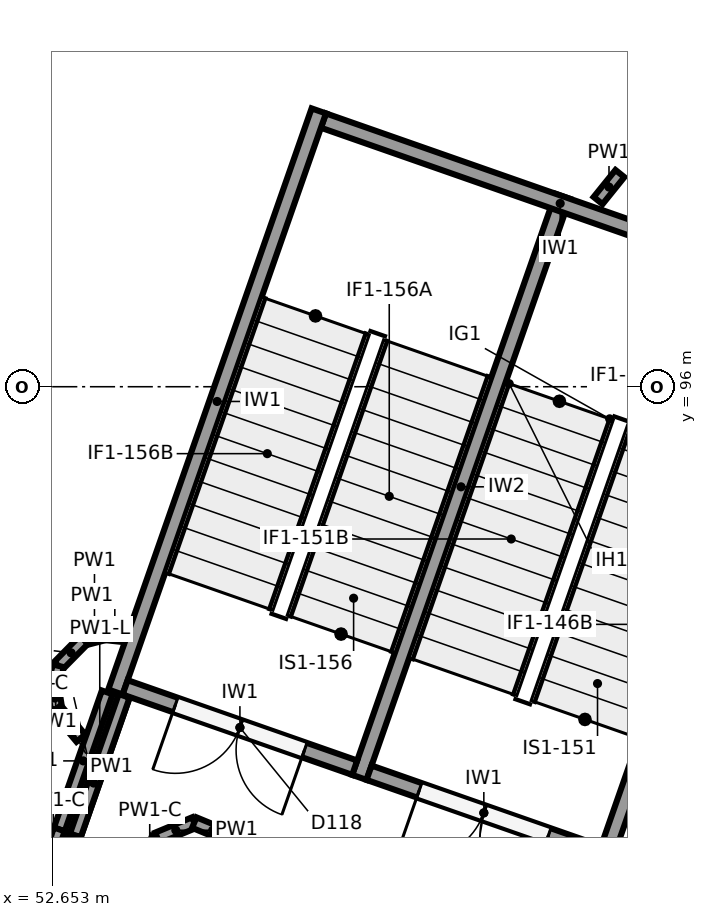
"""IFC4 building model, lengths in metres.
Left out: names, types, materials, properties, quantities, classifications, styles, units other than length and angle.
Written with IfcOpenShell. Run it as: python <this file> out.ifc"""

import sys

from ifc_helpers import new_model, si_unit, direction, frame, frame_2d, origin, origin_2d, place, context, subcontext, project, spatial, rectangle, circle, extrude, element, fill, save


model = new_model("IFC4")
c1 = context("Model", 3, precision=1e-05, world=origin(), true_north=direction((0.0, 1.0)))
c2 = subcontext(c1, "Body", "Model", "MODEL_VIEW")
j1 = project(units=[si_unit("LENGTHUNIT", "METRE"), si_unit("PLANEANGLEUNIT", "RADIAN")], contexts=[c1])
p1 = place(None, origin())
s1 = spatial("IfcSite", under=j1, at=p1, CompositionType="ELEMENT")
p2 = place(p1, origin())
s2 = spatial("IfcBuilding", under=s1, at=p2, CompositionType="ELEMENT")
p3 = place(p2, frame((0.0, 0.0, -4.0)))
s3 = spatial("IfcBuildingStorey", under=s2, at=p3, CompositionType="ELEMENT", Elevation=-4.0)
p4 = place(p3, frame((54.523, 89.579, -1.2), z_axis=(0.0, 0.0, 1.0), x_axis=(1.0, 0.0, 0.0)))
e1 = element("IfcColumn", 1, at=p4, inside=s3, PredefinedType="COLUMN", context=c2, shape_type="SweptSolid", body=[
    extrude(circle(Radius=0.55, at=origin_2d()), origin(), (0.0, 0.0, 1.0), 5.2),
])
p5 = place(p3, frame((62.58, 97.383, -1.2), z_axis=(0.0, 0.0, 1.0), x_axis=(-0.330290006891, -0.943879500438, 0.0)))
e2 = element("IfcWall", 2, at=p5, inside=s3, PredefinedType="SHEAR", context=c2, shape_type="SweptSolid", body=[
    extrude(rectangle(XDim=8.1, YDim=0.2, at=frame_2d((4.05, 0.0))), origin(), (0.0, 0.0, 1.0), 4.8),
])
p6 = place(p3, frame((56.162, 99.629, -1.2), z_axis=(0.0, 0.0, 1.0), x_axis=(-0.330280610426, -0.943882788474, 0.0)))
e3 = element("IfcWall", 3, at=p6, inside=s3, PredefinedType="SHEAR", context=c2, shape_type="SweptSolid", body=[
    extrude(rectangle(XDim=8.1, YDim=0.2, at=frame_2d((4.05, 0.0))), origin(), (0.0, 0.0, 1.0), 4.8),
])
p7 = place(p3, frame((62.453, 97.322, -1.2), z_axis=(0.0, 0.0, 1.0), x_axis=(-0.943880844925, 0.330286164688, 0.0)))
e4 = element("IfcWall", 4, at=p7, inside=s3, PredefinedType="SHEAR", context=c2, shape_type="SweptSolid", body=[
    extrude(rectangle(XDim=6.6, YDim=0.2, at=frame_2d((3.3, 0.0))), origin(), (0.0, 0.0, 1.0), 4.8),
])
p8 = place(p3, frame((59.371, 98.506, -1.2), z_axis=(0.0, 0.0, 1.0), x_axis=(-0.330280610426, -0.943882788474, 0.0)))
e5 = element("IfcWall", 5, at=p8, inside=s3, PredefinedType="SHEAR", context=c2, shape_type="SweptSolid", body=[
    extrude(rectangle(XDim=8.1, YDim=0.2, at=frame_2d((4.05, 0.0))), origin(), (0.0, 0.0, 1.0), 4.8),
])
p9 = place(p3, frame((59.844, 89.865, -1.2), z_axis=(0.0, 0.0, 1.0), x_axis=(-0.943886898693, 0.330268863922, 0.0)))
e6 = element("IfcWall", 6, at=p9, inside=s3, PredefinedType="SHEAR", context=c2, shape_type="SweptSolid", body=[
    extrude(rectangle(XDim=3.2, YDim=0.2, at=frame_2d((1.6, 0.0))), origin(), (0.0, 0.0, 1.0), 4.8),
])
p10 = place(p9, frame((0.7, 0.0, 1.2)))
e7 = element("IfcOpeningElement", 7, at=p10, cuts=e6, PredefinedType="OPENING", context=c2, shape_type="SweptSolid", body=[
    extrude(rectangle(XDim=1.8, YDim=2.1, at=frame_2d((0.9, 1.05))), frame((0.0, 0.11, 0.0), z_axis=(0.0, -1.0, 0.0), x_axis=(1.0, 0.0, 0.0)), (0.0, 0.0, 1.0), 0.22),
])
p11 = place(p3, frame((56.634, 90.988, -1.2), z_axis=(0.0, 0.0, 1.0), x_axis=(-0.943886898693, 0.330268863922, 0.0)))
e8 = element("IfcWall", 8, at=p11, inside=s3, PredefinedType="SHEAR", context=c2, shape_type="SweptSolid", body=[
    extrude(rectangle(XDim=3.2, YDim=0.2, at=frame_2d((1.6, 0.0))), origin(), (0.0, 0.0, 1.0), 4.8),
])
p12 = place(p11, frame((0.7, 0.0, 1.2)))
e9 = element("IfcOpeningElement", 9, at=p12, cuts=e8, PredefinedType="OPENING", context=c2, shape_type="SweptSolid", body=[
    extrude(rectangle(XDim=1.8, YDim=2.1, at=frame_2d((0.9, 1.05))), frame((0.0, 0.11, 0.0), z_axis=(0.0, -1.0, 0.0), x_axis=(1.0, 0.0, 0.0)), (0.0, 0.0, 1.0), 0.22),
])
p13 = place(p3, frame((53.379, 91.979, 0.0), z_axis=(0.0, 0.0, 1.0), x_axis=(-0.330190985446, -0.943914145, 0.0)))
e10 = element("IfcWall", 10, at=p13, inside=s3, PredefinedType="PARTITIONING", context=c2, shape_type="SweptSolid", body=[
    extrude(rectangle(XDim=1.91, YDim=0.15, at=frame_2d((0.955, 0.0))), origin(), (0.0, 0.0, 1.0), 3.6),
])
p14 = place(p3, frame((52.748, 90.176, 0.0), z_axis=(0.0, 0.0, 1.0), x_axis=(-0.330464354332, -0.943818473286, 0.0)))
e11 = element("IfcWall", 11, at=p14, inside=s3, PredefinedType="PARTITIONING", context=c2, shape_type="SweptSolid", body=[
    extrude(rectangle(XDim=0.477, YDim=0.15, at=frame_2d((0.239, 0.0))), origin(), (0.0, 0.0, 1.0), 2.7),
])
p15 = place(p3, frame((60.124, 98.805, 0.0), z_axis=(0.0, 0.0, 1.0), x_axis=(-0.628076009292, -0.778151994505, 0.0)))
e12 = element("IfcWall", 12, at=p15, inside=s3, PredefinedType="PARTITIONING", context=c2, shape_type="SweptSolid", body=[
    extrude(rectangle(XDim=0.457, YDim=0.15, at=frame_2d((0.229, 0.0))), origin(), (0.0, 0.0, 1.0), 3.6),
])
p16 = place(p3, frame((53.837, 89.579, 0.0), z_axis=(0.0, 0.0, 1.0), x_axis=(0.382269640564, 0.924050822143, 0.0)))
e13 = element("IfcWall", 13, at=p16, inside=s3, PredefinedType="PARTITIONING", context=c2, shape_type="SweptSolid", body=[
    extrude(rectangle(XDim=0.525, YDim=0.15, at=frame_2d((0.262, 0.0))), origin(), (0.0, 0.0, 1.0), 2.7),
])
p17 = place(p3, frame((54.038, 90.064, 0.0), z_axis=(0.0, 0.0, 1.0), x_axis=(0.923926306398, 0.382570490689, 0.0)))
e14 = element("IfcWall", 14, at=p17, inside=s3, PredefinedType="PARTITIONING", context=c2, shape_type="SweptSolid", body=[
    extrude(rectangle(XDim=0.526, YDim=0.15, at=frame_2d((0.263, 0.0))), origin(), (0.0, 0.0, 1.0), 3.6),
])
p18 = place(p3, frame((54.523, 90.266, 0.0), z_axis=(0.0, 0.0, 1.0), x_axis=(0.923886494024, -0.382666625355, 0.0)))
e15 = element("IfcWall", 15, at=p18, inside=s3, PredefinedType="PARTITIONING", context=c2, shape_type="SweptSolid", body=[
    extrude(rectangle(XDim=0.525, YDim=0.15, at=frame_2d((0.263, 0.0))), origin(), (0.0, 0.0, 1.0), 3.0),
])
p19 = place(p3, frame((55.009, 90.065, 0.0), z_axis=(0.0, 0.0, 1.0), x_axis=(0.3830633983, -0.923722053911, 0.0)))
e16 = element("IfcWall", 16, at=p19, inside=s3, PredefinedType="PARTITIONING", context=c2, shape_type="SweptSolid", body=[
    extrude(rectangle(XDim=0.525, YDim=0.15, at=frame_2d((0.263, 0.0))), origin(), (0.0, 0.0, 1.0), 2.5),
])
p20 = place(p3, frame((53.601, 91.933, 0.0), z_axis=(0.0, 0.0, 1.0), x_axis=(-0.330328049416, -0.943866187428, 0.0)))
e17 = element("IfcWall", 17, at=p20, inside=s3, PredefinedType="PARTITIONING", context=c2, shape_type="SweptSolid", body=[
    extrude(rectangle(XDim=2.43, YDim=0.15, at=frame_2d((1.215, 0.0))), origin(), (0.0, 0.0, 1.0), 2.7),
])
p21 = place(p3, frame((53.601, 91.933, 2.7), z_axis=(0.0, 0.0, 1.0), x_axis=(-0.330283297121, -0.943881848349, 0.0)))
e18 = element("IfcWall", 18, at=p21, inside=s3, PredefinedType="PARTITIONING", context=c2, shape_type="SweptSolid", body=[
    extrude(rectangle(XDim=1.944, YDim=0.15, at=frame_2d((0.972, 0.0))), origin(), (0.0, 0.0, 1.0), 0.9),
])
p22 = place(p3, frame((53.606, 92.715, 0.0), z_axis=(0.0, 0.0, 1.0), x_axis=(-0.99455723192, 0.104191710011, 0.0)))
e19 = element("IfcWall", 19, at=p22, inside=s3, PredefinedType="PARTITIONING", context=c2, shape_type="SweptSolid", body=[
    extrude(rectangle(XDim=0.258, YDim=0.15, at=frame_2d((0.129, 0.0))), origin(), (0.0, 0.0, 1.0), 3.6),
])
p23 = place(p3, frame((53.35, 92.741, 0.0), z_axis=(0.0, 0.0, 1.0), x_axis=(-0.968217741574, -0.250108786133, 0.0)))
e20 = element("IfcWall", 20, at=p23, inside=s3, PredefinedType="PARTITIONING", context=c2, shape_type="SweptSolid", body=[
    extrude(rectangle(XDim=0.288, YDim=0.15, at=frame_2d((0.144, 0.0))), origin(), (0.0, 0.0, 1.0), 3.6),
])
p24 = place(p3, frame((53.071, 92.669, 0.0), z_axis=(0.0, 0.0, 1.0), x_axis=(-0.701994133163, -0.712182727258, 0.0)))
e21 = element("IfcWall", 21, at=p24, inside=s3, PredefinedType="PARTITIONING", context=c2, shape_type="SweptSolid", body=[
    extrude(rectangle(XDim=0.479, YDim=0.15, at=frame_2d((0.24, 0.0))), origin(), (0.0, 0.0, 1.0), 3.6),
])
p25 = place(p3, frame((52.735, 92.328, 0.0), z_axis=(0.0, 0.0, 1.0), x_axis=(-0.237169904652, -0.971468185957, 0.0)))
e22 = element("IfcWall", 22, at=p25, inside=s3, PredefinedType="PARTITIONING", context=c2, shape_type="SweptSolid", body=[
    extrude(rectangle(XDim=0.289, YDim=0.15, at=frame_2d((0.145, 0.0))), origin(), (0.0, 0.0, 1.0), 3.6),
])
p26 = place(p3, frame((52.666, 92.047, 0.0), z_axis=(0.0, 0.0, 1.0), x_axis=(0.153450889183, -0.988156275398, 0.0)))
e23 = element("IfcWall", 23, at=p26, inside=s3, PredefinedType="PARTITIONING", context=c2, shape_type="SweptSolid", body=[
    extrude(rectangle(XDim=0.29, YDim=0.15, at=frame_2d((0.145, 0.0))), origin(), (0.0, 0.0, 1.0), 3.6),
])
p27 = place(p3, frame((52.71, 91.761, 0.0), z_axis=(0.0, 0.0, 1.0), x_axis=(0.641382989258, -0.767220868519, 0.0)))
e24 = element("IfcWall", 24, at=p27, inside=s3, PredefinedType="PARTITIONING", context=c2, shape_type="SweptSolid", body=[
    extrude(rectangle(XDim=0.5, YDim=0.15, at=frame_2d((0.25, 0.0))), origin(), (0.0, 0.0, 1.0), 3.6),
])
p28 = place(p10, origin())
e25 = element("IfcDoor", 25, at=p28, inside=s3, OperationType="DOUBLE_DOOR_SINGLE_SWING", PredefinedType="DOOR", context=c2, shape_type="SweptSolid", body=[
    extrude(rectangle(XDim=1.8, YDim=2.1, at=frame_2d((0.9, 1.05))), frame((0.0, 0.025, 0.0), z_axis=(0.0, -1.0, 0.0), x_axis=(1.0, 0.0, 0.0)), (0.0, 0.0, 1.0), 0.05),
])
fill(e7, e25)
p29 = place(p12, origin())
e26 = element("IfcDoor", 26, at=p29, inside=s3, OperationType="DOUBLE_DOOR_SINGLE_SWING", PredefinedType="DOOR", context=c2, shape_type="SweptSolid", body=[
    extrude(rectangle(XDim=1.8, YDim=2.1, at=frame_2d((0.9, 1.05))), frame((0.0, 0.025, 0.0), z_axis=(0.0, -1.0, 0.0), x_axis=(1.0, 0.0, 0.0)), (0.0, 0.0, 1.0), 0.05),
])
fill(e9, e26)
save(model, sys.argv[1])
